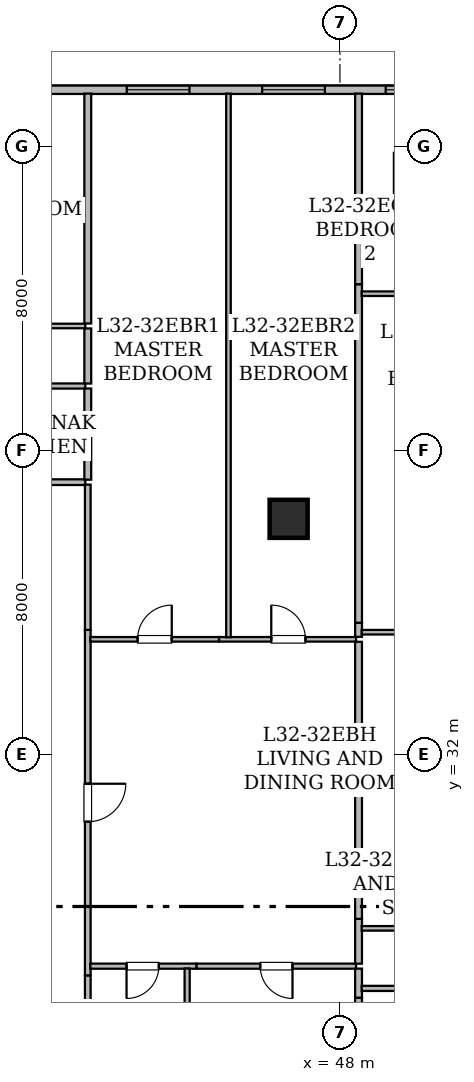
"""IFC4 building model, lengths in metres.
Left out: names, types, materials, properties, quantities, classifications, styles, units other than length and angle.
Written with IfcOpenShell. Run it as: python <this file> out.ifc"""

import sys

from ifc_helpers import new_model, si_unit, direction, frame, frame_2d, origin, origin_2d, place, context, subcontext, project, spatial, rectangle, hollow_rectangle, extrude, element, fill, save


model = new_model("IFC4")
c1 = context("Model", 3, precision=1e-05, world=origin(), true_north=direction((0.0, 1.0)))
c2 = subcontext(c1, "Body", "Model", "MODEL_VIEW")
j1 = project(units=[si_unit("LENGTHUNIT", "METRE"), si_unit("PLANEANGLEUNIT", "RADIAN")], contexts=[c1])
p1 = place(None, origin())
s1 = spatial("IfcSite", under=j1, at=p1, CompositionType="ELEMENT")
p2 = place(p1, origin())
s2 = spatial("IfcBuilding", under=s1, at=p2, CompositionType="ELEMENT")
p3 = place(p2, frame((0.0, 0.0, 127.45)))
s3 = spatial("IfcBuildingStorey", under=s2, at=p3, CompositionType="ELEMENT", Elevation=127.45)
p4 = place(p3, frame((46.65, 38.2, 0.0), z_axis=(0.0, 0.0, 1.0), x_axis=(1.0, 0.0, 0.0)))
e1 = element("IfcColumn", 1, at=p4, inside=s3, PredefinedType="COLUMN", context=c2, shape_type="SweptSolid", body=[
    extrude(hollow_rectangle(XDim=1.0, YDim=1.0, WallThickness=0.05, at=origin_2d()), origin(), (0.0, 0.0, 1.0), 3.65),
])
p5 = place(p3, frame((13.715, 49.49, 0.0), z_axis=(0.0, 0.0, 1.0), x_axis=(1.0, 0.0, 0.0)))
e2 = element("IfcWall", 2, at=p5, inside=s3, PredefinedType="STANDARD", context=c2, shape_type="SweptSolid", body=[
    extrude(rectangle(XDim=38.639, YDim=0.22, at=frame_2d((19.319, 0.0))), origin(), (0.0, 0.0, 1.0), 3.43),
])
p6 = place(p5, frame((2.243, 0.0, 0.85)))
e3 = element("IfcOpeningElement", 3, at=p6, cuts=e2, PredefinedType="OPENING", context=c2, shape_type="SweptSolid", body=[
    extrude(rectangle(XDim=1.65, YDim=1.55, at=frame_2d((0.825, 0.775))), frame((0.0, 0.12, 0.0), z_axis=(0.0, -1.0, 0.0), x_axis=(1.0, 0.0, 0.0)), (0.0, 0.0, 1.0), 0.24),
])
p7 = place(p5, frame((8.455, 0.0, 0.8)))
e4 = element("IfcOpeningElement", 4, at=p7, cuts=e2, PredefinedType="OPENING", context=c2, shape_type="SweptSolid", body=[
    extrude(rectangle(XDim=1.2, YDim=1.5, at=frame_2d((0.6, 0.75))), frame((0.0, 0.12, 0.0), z_axis=(0.0, -1.0, 0.0), x_axis=(1.0, 0.0, 0.0)), (0.0, 0.0, 1.0), 0.24),
])
p8 = place(p5, frame((5.805, 0.0, 0.85)))
e5 = element("IfcOpeningElement", 5, at=p8, cuts=e2, PredefinedType="OPENING", context=c2, shape_type="SweptSolid", body=[
    extrude(rectangle(XDim=1.65, YDim=1.55, at=frame_2d((0.825, 0.775))), frame((0.0, 0.12, 0.0), z_axis=(0.0, -1.0, 0.0), x_axis=(1.0, 0.0, 0.0)), (0.0, 0.0, 1.0), 0.24),
])
p9 = place(p5, frame((10.655, 0.0, 0.85)))
e6 = element("IfcOpeningElement", 6, at=p9, cuts=e2, PredefinedType="OPENING", context=c2, shape_type="SweptSolid", body=[
    extrude(rectangle(XDim=1.65, YDim=1.55, at=frame_2d((0.825, 0.775))), frame((0.0, 0.12, 0.0), z_axis=(0.0, -1.0, 0.0), x_axis=(1.0, 0.0, 0.0)), (0.0, 0.0, 1.0), 0.24),
])
p10 = place(p5, frame((15.556, 0.0, 0.85)))
e7 = element("IfcOpeningElement", 7, at=p10, cuts=e2, PredefinedType="OPENING", context=c2, shape_type="SweptSolid", body=[
    extrude(rectangle(XDim=1.65, YDim=1.55, at=frame_2d((0.825, 0.775))), frame((0.0, 0.12, 0.0), z_axis=(0.0, -1.0, 0.0), x_axis=(1.0, 0.0, 0.0)), (0.0, 0.0, 1.0), 0.24),
])
p11 = place(p5, frame((22.821, 0.0, 0.85)))
e8 = element("IfcOpeningElement", 8, at=p11, cuts=e2, PredefinedType="OPENING", context=c2, shape_type="SweptSolid", body=[
    extrude(rectangle(XDim=1.65, YDim=1.55, at=frame_2d((0.825, 0.775))), frame((0.0, 0.12, 0.0), z_axis=(0.0, -1.0, 0.0), x_axis=(1.0, 0.0, 0.0)), (0.0, 0.0, 1.0), 0.24),
])
p12 = place(p5, frame((32.239, 0.0, 0.85)))
e9 = element("IfcOpeningElement", 9, at=p12, cuts=e2, PredefinedType="OPENING", context=c2, shape_type="SweptSolid", body=[
    extrude(rectangle(XDim=1.65, YDim=1.55, at=frame_2d((0.825, 0.775))), frame((0.0, 0.12, 0.0), z_axis=(0.0, -1.0, 0.0), x_axis=(1.0, 0.0, 0.0)), (0.0, 0.0, 1.0), 0.24),
])
p13 = place(p5, frame((28.676, 0.0, 0.85)))
e10 = element("IfcOpeningElement", 10, at=p13, cuts=e2, PredefinedType="OPENING", context=c2, shape_type="SweptSolid", body=[
    extrude(rectangle(XDim=1.65, YDim=1.55, at=frame_2d((0.825, 0.775))), frame((0.0, 0.12, 0.0), z_axis=(0.0, -1.0, 0.0), x_axis=(1.0, 0.0, 0.0)), (0.0, 0.0, 1.0), 0.24),
])
p14 = place(p5, frame((35.489, 0.0, 0.85)))
e11 = element("IfcOpeningElement", 11, at=p14, cuts=e2, PredefinedType="OPENING", context=c2, shape_type="SweptSolid", body=[
    extrude(rectangle(XDim=1.65, YDim=1.55, at=frame_2d((0.825, 0.775))), frame((0.0, 0.12, 0.0), z_axis=(0.0, -1.0, 0.0), x_axis=(1.0, 0.0, 0.0)), (0.0, 0.0, 1.0), 0.24),
])
p15 = place(p3, frame((34.299, 39.165, 0.0), z_axis=(0.0, 0.0, 1.0), x_axis=(1.0, 0.0, 0.0)))
e12 = element("IfcWall", 12, at=p15, inside=s3, PredefinedType="STANDARD", context=c2, shape_type="SweptSolid", body=[
    extrude(rectangle(XDim=7.001, YDim=0.15, at=frame_2d((3.5, 0.0))), origin(), (0.0, 0.0, 1.0), 2.647),
])
p16 = place(p3, frame((41.365, 35.279, 0.0), z_axis=(0.0, 0.0, 1.0), x_axis=(0.0, -1.0, 0.0)))
e13 = element("IfcWall", 13, at=p16, inside=s3, PredefinedType="STANDARD", context=c2, shape_type="SweptSolid", body=[
    extrude(rectangle(XDim=9.098, YDim=0.15, at=frame_2d((4.549, 0.0))), origin(), (0.0, 0.0, 1.0), 3.107),
])
p17 = place(p16, frame((4.049, 0.0, 0.0)))
e14 = element("IfcOpeningElement", 14, at=p17, cuts=e13, PredefinedType="OPENING", context=c2, shape_type="SweptSolid", body=[
    extrude(rectangle(XDim=1.0, YDim=2.15, at=frame_2d((0.5, 1.075))), frame((0.0, 0.085, 0.0), z_axis=(0.0, -1.0, 0.0), x_axis=(1.0, 0.0, 0.0)), (0.0, 0.0, 1.0), 0.17),
])
p18 = place(p3, frame((41.365, 26.181, 0.0), z_axis=(0.0, 0.0, 1.0), x_axis=(0.0, -1.0, 0.0)))
e15 = element("IfcWall", 15, at=p18, inside=s3, PredefinedType="STANDARD", context=c2, shape_type="SweptSolid", body=[
    extrude(rectangle(XDim=3.981, YDim=0.15, at=frame_2d((1.99, 0.0))), origin(), (0.0, 0.0, 1.0), 3.43),
])
p19 = place(p3, frame((41.365, 39.1, 0.0), z_axis=(0.0, 0.0, 1.0), x_axis=(0.0, -1.0, 0.0)))
e16 = element("IfcWall", 16, at=p19, inside=s3, PredefinedType="STANDARD", context=c2, shape_type="SweptSolid", body=[
    extrude(rectangle(XDim=3.821, YDim=0.15, at=frame_2d((1.911, 0.0))), origin(), (0.0, 0.0, 1.0), 2.647),
])
p20 = place(p3, frame((41.3, 41.695, 0.0), z_axis=(0.0, 0.0, 1.0), x_axis=(-1.0, 0.0, 0.0)))
e17 = element("IfcWall", 17, at=p20, inside=s3, PredefinedType="PARTITIONING", context=c2, shape_type="SweptSolid", body=[
    extrude(rectangle(XDim=7.315, YDim=0.135, at=frame_2d((3.657, 0.0))), origin(), (0.0, 0.0, 1.0), 2.647),
])
p21 = place(p20, frame((3.233, 0.0, 0.0)))
e18 = element("IfcOpeningElement", 18, at=p21, cuts=e17, PredefinedType="OPENING", context=c2, shape_type="SweptSolid", body=[
    extrude(rectangle(XDim=0.85, YDim=2.1, at=frame_2d((0.425, 1.05))), frame((0.0, 0.077, 0.0), z_axis=(0.0, -1.0, 0.0), x_axis=(1.0, 0.0, 0.0)), (0.0, 0.0, 1.0), 0.155),
])
p22 = place(p3, frame((33.607, 43.275, 0.0), z_axis=(0.0, 0.0, 1.0), x_axis=(1.0, 0.0, 0.0)))
e19 = element("IfcWall", 19, at=p22, inside=s3, PredefinedType="PARTITIONING", context=c2, shape_type="SweptSolid", body=[
    extrude(rectangle(XDim=7.693, YDim=0.12, at=frame_2d((3.847, 0.0))), origin(), (0.0, 0.0, 1.0), 2.647),
])
p23 = place(p22, frame((3.396, 0.0, 0.0)))
e20 = element("IfcOpeningElement", 20, at=p23, cuts=e19, PredefinedType="OPENING", context=c2, shape_type="SweptSolid", body=[
    extrude(rectangle(XDim=0.9, YDim=2.1, at=frame_2d((0.45, 1.05))), frame((0.0, 0.07, 0.0), z_axis=(0.0, -1.0, 0.0), x_axis=(1.0, 0.0, 0.0)), (0.0, 0.0, 1.0), 0.14),
])
p24 = place(p3, frame((41.365, 43.21, 0.0), z_axis=(0.0, 0.0, 1.0), x_axis=(0.0, -1.0, 0.0)))
e21 = element("IfcWall", 21, at=p24, inside=s3, PredefinedType="STANDARD", context=c2, shape_type="SweptSolid", body=[
    extrude(rectangle(XDim=1.45, YDim=0.18, at=frame_2d((0.725, 0.0))), origin(), (0.0, 0.0, 1.0), 3.43),
])
p25 = place(p3, frame((41.365, 41.63, 0.0), z_axis=(0.0, 0.0, 1.0), x_axis=(0.0, -1.0, 0.0)))
e22 = element("IfcWall", 22, at=p25, inside=s3, PredefinedType="STANDARD", context=c2, shape_type="SweptSolid", body=[
    extrude(rectangle(XDim=2.4, YDim=0.18, at=frame_2d((1.2, 0.0))), origin(), (0.0, 0.0, 1.0), 3.43),
])
p26 = place(p3, frame((41.365, 49.388, 0.0), z_axis=(0.0, 0.0, 1.0), x_axis=(0.0, -1.0, 0.0)))
e23 = element("IfcWall", 23, at=p26, inside=s3, PredefinedType="STANDARD", context=c2, shape_type="SweptSolid", body=[
    extrude(rectangle(XDim=6.048, YDim=0.18, at=frame_2d((3.024, 0.0))), origin(), (0.0, 0.0, 1.0), 2.876),
])
p27 = place(p3, frame((44.818, 35.03, 0.0), z_axis=(0.0, 0.0, 1.0), x_axis=(1.0, 0.0, 0.0)))
e24 = element("IfcWall", 24, at=p27, inside=s3, PredefinedType="PARTITIONING", context=c2, shape_type="SweptSolid", body=[
    extrude(rectangle(XDim=3.607, YDim=0.12, at=frame_2d((1.803, 0.0))), origin(), (0.0, 0.0, 1.0), 2.647),
])
p28 = place(p27, frame((1.375, 0.0, 0.0)))
e25 = element("IfcOpeningElement", 25, at=p28, cuts=e24, PredefinedType="OPENING", context=c2, shape_type="SweptSolid", body=[
    extrude(rectangle(XDim=0.9, YDim=2.1, at=frame_2d((0.45, 1.05))), frame((0.0, 0.07, 0.0), z_axis=(0.0, -1.0, 0.0), x_axis=(1.0, 0.0, 0.0)), (0.0, 0.0, 1.0), 0.14),
])
p29 = place(p3, frame((44.229, 26.43, 0.0), z_axis=(0.0, 0.0, 1.0), x_axis=(-1.0, 0.0, 0.0)))
e26 = element("IfcWall", 26, at=p29, inside=s3, PredefinedType="PARTITIONING", context=c2, shape_type="SweptSolid", body=[
    extrude(rectangle(XDim=2.797, YDim=0.135, at=frame_2d((1.398, 0.0))), origin(), (0.0, 0.0, 1.0), 3.43),
])
p30 = place(p29, frame((0.994, 0.0, 0.0)))
e27 = element("IfcOpeningElement", 27, at=p30, cuts=e26, PredefinedType="OPENING", context=c2, shape_type="SweptSolid", body=[
    extrude(rectangle(XDim=0.85, YDim=2.1, at=frame_2d((0.425, 1.05))), frame((0.0, 0.077, 0.0), z_axis=(0.0, -1.0, 0.0), x_axis=(1.0, 0.0, 0.0)), (0.0, 0.0, 1.0), 0.155),
])
p31 = place(p3, frame((48.425, 26.43, 0.0), z_axis=(0.0, 0.0, 1.0), x_axis=(-1.0, 0.0, 0.0)))
e28 = element("IfcWall", 28, at=p31, inside=s3, PredefinedType="PARTITIONING", context=c2, shape_type="SweptSolid", body=[
    extrude(rectangle(XDim=4.196, YDim=0.135, at=frame_2d((2.098, 0.0))), origin(), (0.0, 0.0, 1.0), 2.647),
])
p32 = place(p31, frame((1.673, 0.0, 0.0)))
e29 = element("IfcOpeningElement", 29, at=p32, cuts=e28, PredefinedType="OPENING", context=c2, shape_type="SweptSolid", body=[
    extrude(rectangle(XDim=0.85, YDim=2.1, at=frame_2d((0.425, 1.05))), frame((0.0, 0.077, 0.0), z_axis=(0.0, -1.0, 0.0), x_axis=(1.0, 0.0, 0.0)), (0.0, 0.0, 1.0), 0.155),
])
p33 = place(p3, frame((41.432, 35.03, 0.0), z_axis=(0.0, 0.0, 1.0), x_axis=(1.0, 0.0, 0.0)))
e30 = element("IfcWall", 30, at=p33, inside=s3, PredefinedType="PARTITIONING", context=c2, shape_type="SweptSolid", body=[
    extrude(rectangle(XDim=3.386, YDim=0.12, at=frame_2d((1.693, 0.0))), origin(), (0.0, 0.0, 1.0), 3.43),
])
p34 = place(p33, frame((1.243, 0.0, 0.0)))
e31 = element("IfcOpeningElement", 31, at=p34, cuts=e30, PredefinedType="OPENING", context=c2, shape_type="SweptSolid", body=[
    extrude(rectangle(XDim=0.9, YDim=2.1, at=frame_2d((0.45, 1.05))), frame((0.0, 0.07, 0.0), z_axis=(0.0, -1.0, 0.0), x_axis=(1.0, 0.0, 0.0)), (0.0, 0.0, 1.0), 0.14),
])
p35 = place(p3, frame((48.49, 27.674, 0.0), z_axis=(0.0, 0.0, 1.0), x_axis=(0.0, -1.0, 0.0)))
e32 = element("IfcWall", 32, at=p35, inside=s3, PredefinedType="STANDARD", context=c2, shape_type="SweptSolid", body=[
    extrude(rectangle(XDim=1.179, YDim=0.18, at=frame_2d((0.589, 0.0))), origin(), (0.0, 0.0, 1.0), 3.43),
])
p36 = place(p3, frame((48.49, 34.965, 0.0), z_axis=(0.0, 0.0, 1.0), x_axis=(0.0, -1.0, 0.0)))
e33 = element("IfcWall", 33, at=p36, inside=s3, PredefinedType="STANDARD", context=c2, shape_type="SweptSolid", body=[
    extrude(rectangle(XDim=7.291, YDim=0.18, at=frame_2d((3.646, 0.0))), origin(), (0.0, 0.0, 1.0), 3.43),
])
p37 = place(p3, frame((45.067, 35.084, 0.0), z_axis=(0.0, 0.0, 1.0), x_axis=(0.0, 1.0, 0.0)))
e34 = element("IfcWall", 34, at=p37, inside=s3, PredefinedType="PARTITIONING", context=c2, shape_type="SweptSolid", body=[
    extrude(rectangle(XDim=14.304, YDim=0.12, at=frame_2d((7.152, 0.0))), origin(), (0.0, 0.0, 1.0), 2.647),
])
p38 = place(p3, frame((48.49, 35.466, 0.0), z_axis=(0.0, 0.0, 1.0), x_axis=(0.0, -1.0, 0.0)))
e35 = element("IfcWall", 35, at=p38, inside=s3, PredefinedType="STANDARD", context=c2, shape_type="SweptSolid", body=[
    extrude(rectangle(XDim=0.371, YDim=0.18, at=frame_2d((0.186, 0.0))), origin(), (0.0, 0.0, 1.0), 3.43),
])
p39 = place(p3, frame((48.49, 44.373, 0.0), z_axis=(0.0, 0.0, 1.0), x_axis=(0.0, -1.0, 0.0)))
e36 = element("IfcWall", 36, at=p39, inside=s3, PredefinedType="STANDARD", context=c2, shape_type="SweptSolid", body=[
    extrude(rectangle(XDim=8.907, YDim=0.18, at=frame_2d((4.454, 0.0))), origin(), (0.0, 0.0, 1.0), 2.647),
])
p40 = place(p3, frame((48.49, 49.388, 0.0), z_axis=(0.0, 0.0, 1.0), x_axis=(0.0, -1.0, 0.0)))
e37 = element("IfcWall", 37, at=p40, inside=s3, PredefinedType="STANDARD", context=c2, shape_type="SweptSolid", body=[
    extrude(rectangle(XDim=5.015, YDim=0.18, at=frame_2d((2.507, 0.0))), origin(), (0.0, 0.0, 1.0), 2.647),
])
p41 = place(p3, frame((43.98, 26.369, 0.0), z_axis=(0.0, 0.0, 1.0), x_axis=(0.0, -1.0, 0.0)))
e38 = element("IfcWall", 38, at=p41, inside=s3, PredefinedType="PARTITIONING", context=c2, shape_type="SweptSolid", body=[
    extrude(rectangle(XDim=4.037, YDim=0.135, at=frame_2d((2.019, 0.0))), origin(), (0.0, 0.0, 1.0), 3.43),
])
p42 = place(p3, frame((48.49, 26.365, 0.0), z_axis=(0.0, 0.0, 1.0), x_axis=(0.0, -1.0, 0.0)))
e39 = element("IfcWall", 39, at=p42, inside=s3, PredefinedType="STANDARD", context=c2, shape_type="SweptSolid", body=[
    extrude(rectangle(XDim=0.769, YDim=0.18, at=frame_2d((0.385, 0.0))), origin(), (0.0, 0.0, 1.0), 3.43),
])
p43 = place(p3, frame((48.49, 25.596, 0.0), z_axis=(0.0, 0.0, 1.0), x_axis=(0.0, -1.0, 0.0)))
e40 = element("IfcWall", 40, at=p43, inside=s3, PredefinedType="STANDARD", context=c2, shape_type="SweptSolid", body=[
    extrude(rectangle(XDim=3.264, YDim=0.18, at=frame_2d((1.632, 0.0))), origin(), (0.0, 0.0, 1.0), 3.43),
])
p44 = place(p3, frame((50.958, 25.845, 0.0), z_axis=(0.0, 0.0, 1.0), x_axis=(-1.0, 0.0, 0.0)))
e41 = element("IfcWall", 41, at=p44, inside=s3, PredefinedType="PARTITIONING", context=c2, shape_type="SweptSolid", body=[
    extrude(rectangle(XDim=2.386, YDim=0.135, at=frame_2d((1.193, 0.0))), origin(), (0.0, 0.0, 1.0), 3.43),
])
p45 = place(p3, frame((48.572, 27.425, 0.0), z_axis=(0.0, 0.0, 1.0), x_axis=(1.0, 0.0, 0.0)))
e42 = element("IfcWall", 42, at=p45, inside=s3, PredefinedType="PARTITIONING", context=c2, shape_type="SweptSolid", body=[
    extrude(rectangle(XDim=3.231, YDim=0.12, at=frame_2d((1.615, 0.0))), origin(), (0.0, 0.0, 1.0), 3.43),
])
p46 = place(p3, frame((48.572, 35.217, 0.0), z_axis=(0.0, 0.0, 1.0), x_axis=(1.0, 0.0, 0.0)))
e43 = element("IfcWall", 43, at=p46, inside=s3, PredefinedType="PARTITIONING", context=c2, shape_type="SweptSolid", body=[
    extrude(rectangle(XDim=3.112, YDim=0.12, at=frame_2d((1.556, 0.0))), origin(), (0.0, 0.0, 1.0), 3.43),
])
p47 = place(p3, frame((48.572, 44.124, 0.0), z_axis=(0.0, 0.0, 1.0), x_axis=(1.0, 0.0, 0.0)))
e44 = element("IfcWall", 44, at=p47, inside=s3, PredefinedType="PARTITIONING", context=c2, shape_type="SweptSolid", body=[
    extrude(rectangle(XDim=3.112, YDim=0.12, at=frame_2d((1.556, 0.0))), origin(), (0.0, 0.0, 1.0), 2.647),
])
p48 = place(p12, origin())
e45 = element("IfcWindow", 45, at=p48, inside=s3, PartitioningType="SINGLE_PANEL", PredefinedType="WINDOW", context=c2, shape_type="SweptSolid", body=[
    extrude(rectangle(XDim=1.65, YDim=1.55, at=frame_2d((0.825, 0.775))), frame((0.0, 0.03, 0.0), z_axis=(0.0, -1.0, 0.0), x_axis=(1.0, 0.0, 0.0)), (0.0, 0.0, 1.0), 0.06),
])
fill(e9, e45)
p49 = place(p13, origin())
e46 = element("IfcWindow", 46, at=p49, inside=s3, PartitioningType="SINGLE_PANEL", PredefinedType="WINDOW", context=c2, shape_type="SweptSolid", body=[
    extrude(rectangle(XDim=1.65, YDim=1.55, at=frame_2d((0.825, 0.775))), frame((0.0, 0.03, 0.0), z_axis=(0.0, -1.0, 0.0), x_axis=(1.0, 0.0, 0.0)), (0.0, 0.0, 1.0), 0.06),
])
fill(e10, e46)
p50 = place(p14, origin())
e47 = element("IfcWindow", 47, at=p50, inside=s3, PartitioningType="SINGLE_PANEL", PredefinedType="WINDOW", context=c2, shape_type="SweptSolid", body=[
    extrude(rectangle(XDim=1.65, YDim=1.55, at=frame_2d((0.825, 0.775))), frame((0.0, 0.03, 0.0), z_axis=(0.0, -1.0, 0.0), x_axis=(1.0, 0.0, 0.0)), (0.0, 0.0, 1.0), 0.06),
])
fill(e11, e47)
p51 = place(p17, origin())
e48 = element("IfcDoor", 48, at=p51, inside=s3, OperationType="SINGLE_SWING_LEFT", PredefinedType="DOOR", context=c2, shape_type="SweptSolid", body=[
    extrude(rectangle(XDim=1.0, YDim=2.15, at=frame_2d((0.5, 1.075))), frame((0.0, 0.025, 0.0), z_axis=(0.0, -1.0, 0.0), x_axis=(1.0, 0.0, 0.0)), (0.0, 0.0, 1.0), 0.05),
])
fill(e14, e48)
p52 = place(p28, origin())
e49 = element("IfcDoor", 49, at=p52, inside=s3, OperationType="SINGLE_SWING_LEFT", PredefinedType="DOOR", context=c2, shape_type="SweptSolid", body=[
    extrude(rectangle(XDim=0.9, YDim=2.1, at=frame_2d((0.45, 1.05))), frame((0.0, 0.025, 0.0), z_axis=(0.0, -1.0, 0.0), x_axis=(1.0, 0.0, 0.0)), (0.0, 0.0, 1.0), 0.05),
])
fill(e25, e49)
p53 = place(p30, origin())
e50 = element("IfcDoor", 50, at=p53, inside=s3, OperationType="SINGLE_SWING_RIGHT", PredefinedType="DOOR", context=c2, shape_type="SweptSolid", body=[
    extrude(rectangle(XDim=0.85, YDim=2.1, at=frame_2d((0.425, 1.05))), frame((0.0, 0.025, 0.0), z_axis=(0.0, -1.0, 0.0), x_axis=(1.0, 0.0, 0.0)), (0.0, 0.0, 1.0), 0.05),
])
fill(e27, e50)
p54 = place(p32, origin())
e51 = element("IfcDoor", 51, at=p54, inside=s3, OperationType="SINGLE_SWING_LEFT", PredefinedType="DOOR", context=c2, shape_type="SweptSolid", body=[
    extrude(rectangle(XDim=0.85, YDim=2.1, at=frame_2d((0.425, 1.05))), frame((0.0, 0.025, 0.0), z_axis=(0.0, -1.0, 0.0), x_axis=(1.0, 0.0, 0.0)), (0.0, 0.0, 1.0), 0.05),
])
fill(e29, e51)
p55 = place(p34, origin())
e52 = element("IfcDoor", 52, at=p55, inside=s3, OperationType="SINGLE_SWING_RIGHT", PredefinedType="DOOR", context=c2, shape_type="SweptSolid", body=[
    extrude(rectangle(XDim=0.9, YDim=2.1, at=frame_2d((0.45, 1.05))), frame((0.0, 0.025, 0.0), z_axis=(0.0, -1.0, 0.0), x_axis=(1.0, 0.0, 0.0)), (0.0, 0.0, 1.0), 0.05),
])
fill(e31, e52)
save(model, sys.argv[1])
